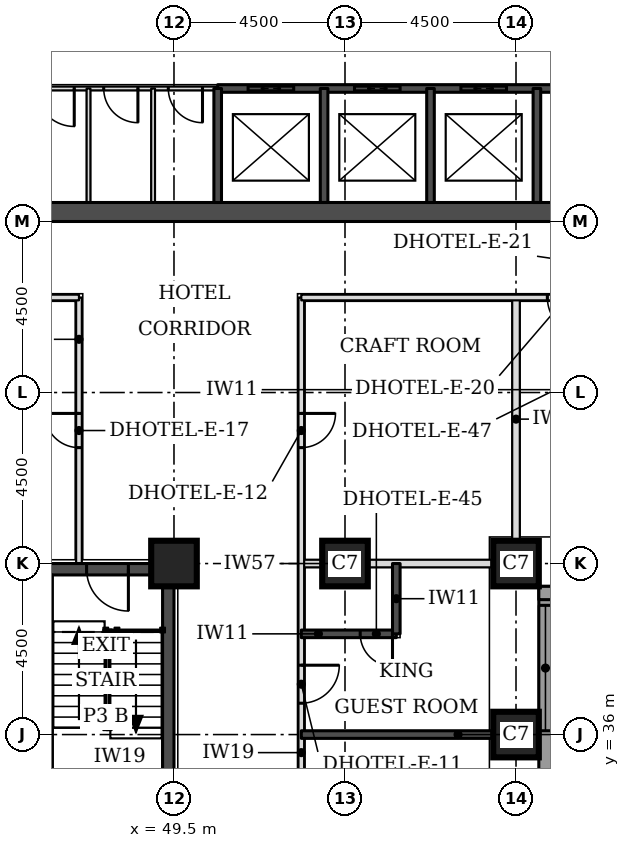
"""IFC4 building model, lengths in metres.
Left out: names, types, materials, properties, quantities, classifications, styles, units other than length and angle.
Written with IfcOpenShell. Run it as: python <this file> out.ifc"""

import sys

from ifc_helpers import new_model, si_unit, direction, frame, frame_2d, origin, origin_2d, place, context, subcontext, project, spatial, rectangle, extrude, element, fill, save


model = new_model("IFC4")
c1 = context("Model", 3, precision=1e-05, world=origin(), true_north=direction((0.0, 1.0)))
c2 = subcontext(c1, "Body", "Model", "MODEL_VIEW")
j1 = project(units=[si_unit("LENGTHUNIT", "METRE"), si_unit("PLANEANGLEUNIT", "RADIAN")], contexts=[c1])
p1 = place(None, origin())
s1 = spatial("IfcSite", under=j1, at=p1, CompositionType="ELEMENT")
p2 = place(p1, origin())
s2 = spatial("IfcBuilding", under=s1, at=p2, CompositionType="ELEMENT")
p3 = place(p2, frame((0.0, 0.0, 39.6)))
s3 = spatial("IfcBuildingStorey", under=s2, at=p3, CompositionType="ELEMENT", Elevation=39.6)
for number, where, z_axis, x_axis in (
    (1, (58.5, 36.0, 0.0), (0.0, 0.0, 1.0), (1.0, 0.0, 0.0)),
    (2, (49.5, 40.5, 0.0), (0.0, 0.0, 1.0), (1.0, 0.0, 0.0)),
    (3, (54.0, 40.5, 0.0), (0.0, 0.0, 1.0), (1.0, 0.0, 0.0)),
    (4, (58.5, 40.5, 0.0), (0.0, 0.0, 1.0), (1.0, 0.0, 0.0)),
):
    element("IfcColumn", number, at=place(p3, frame(where, z_axis=z_axis, x_axis=x_axis)), inside=s3, PredefinedType="COLUMN", context=c2, shape_type="SweptSolid", body=[
        extrude(rectangle(XDim=1.2, YDim=1.2, at=origin_2d()), origin(), (0.0, 0.0, 1.0), 3.3),
    ])
p4 = place(p3, frame((45.5, 49.75, 0.0), z_axis=(0.0, 0.0, 1.0), x_axis=(1.0, 0.0, 0.0)))
e5 = element("IfcWall", 5, at=p4, inside=s3, PredefinedType="SHEAR", context=c2, shape_type="SweptSolid", body=[
    extrude(rectangle(XDim=21.5, YDim=0.5, at=frame_2d((10.75, 0.0))), origin(), (0.0, 0.0, 1.0), 3.3),
])
p5 = place(p3, frame((40.8, 40.35, 0.0), z_axis=(0.0, 0.0, 1.0), x_axis=(1.0, 0.0, 0.0)))
e6 = element("IfcWall", 6, at=p5, inside=s3, PredefinedType="SHEAR", context=c2, shape_type="SweptSolid", body=[
    extrude(rectangle(XDim=8.4, YDim=0.3, at=frame_2d((4.2, 0.0))), origin(), (0.0, 0.0, 1.0), 3.3),
])
p6 = place(p5, frame((6.4, 0.0, 0.0)))
e7 = element("IfcOpeningElement", 7, at=p6, cuts=e6, PredefinedType="OPENING", context=c2, shape_type="SweptSolid", body=[
    extrude(rectangle(XDim=1.1, YDim=2.1, at=frame_2d((0.55, 1.05))), frame((0.0, 0.16, 0.0), z_axis=(0.0, -1.0, 0.0), x_axis=(1.0, 0.0, 0.0)), (0.0, 0.0, 1.0), 0.32),
])
p7 = place(p3, frame((49.35, 31.5, 0.0), z_axis=(0.0, 0.0, 1.0), x_axis=(0.0, 1.0, 0.0)))
e8 = element("IfcWall", 8, at=p7, inside=s3, PredefinedType="SHEAR", context=c2, shape_type="SweptSolid", body=[
    extrude(rectangle(XDim=9.0, YDim=0.3, at=frame_2d((4.5, 0.0))), origin(), (0.0, 0.0, 1.0), 3.3),
])
p8 = place(p3, frame((59.275, 22.106, 0.0), z_axis=(0.0, 0.0, 1.0), x_axis=(0.0, 1.0, 0.0)))
e9 = element("IfcWall", 9, at=p8, inside=s3, PredefinedType="STANDARD", context=c2, shape_type="SweptSolid", body=[
    extrude(rectangle(XDim=17.793, YDim=0.35, at=frame_2d((8.897, 0.0))), origin(), (0.0, 0.0, 1.0), 3.055),
])
p9 = place(p8, frame((5.493, 0.0, 0.8)))
e10 = element("IfcOpeningElement", 10, at=p9, cuts=e9, PredefinedType="OPENING", context=c2, shape_type="SweptSolid", body=[
    extrude(rectangle(XDim=3.3, YDim=1.5, at=frame_2d((1.65, 0.75))), frame((0.0, 0.185, 0.0), z_axis=(0.0, -1.0, 0.0), x_axis=(1.0, 0.0, 0.0)), (0.0, 0.0, 1.0), 0.37),
])
p10 = place(p8, frame((13.993, 0.0, 0.8)))
e11 = element("IfcOpeningElement", 11, at=p10, cuts=e9, PredefinedType="OPENING", context=c2, shape_type="SweptSolid", body=[
    extrude(rectangle(XDim=3.3, YDim=1.5, at=frame_2d((1.65, 0.75))), frame((0.0, 0.185, 0.0), z_axis=(0.0, -1.0, 0.0), x_axis=(1.0, 0.0, 0.0)), (0.0, 0.0, 1.0), 0.37),
])
p11 = place(p3, frame((59.1, 39.725, 0.0), z_axis=(0.0, 0.0, 1.0), x_axis=(1.0, 0.0, 0.0)))
e12 = element("IfcWall", 12, at=p11, inside=s3, PredefinedType="STANDARD", context=c2, shape_type="SweptSolid", body=[
    extrude(rectangle(XDim=13.293, YDim=0.35, at=frame_2d((6.647, 0.0))), origin(), (0.0, 0.0, 1.0), 3.055),
])
p12 = place(p11, frame((0.5, 0.0, 0.8)))
e13 = element("IfcOpeningElement", 13, at=p12, cuts=e12, PredefinedType="OPENING", context=c2, shape_type="SweptSolid", body=[
    extrude(rectangle(XDim=3.3, YDim=1.5, at=frame_2d((1.65, 0.75))), frame((0.0, 0.185, 0.0), z_axis=(0.0, -1.0, 0.0), x_axis=(1.0, 0.0, 0.0)), (0.0, 0.0, 1.0), 0.37),
])
p13 = place(p3, frame((52.85, 40.5, 0.0), z_axis=(0.0, 0.0, 1.0), x_axis=(1.0, 0.0, 0.0)))
e14 = element("IfcWall", 14, at=p13, inside=s3, PredefinedType="PARTITIONING", context=c2, shape_type="SweptSolid", body=[
    extrude(rectangle(XDim=5.05, YDim=0.2, at=frame_2d((2.525, 0.0))), origin(), (0.0, 0.0, 1.0), 2.33),
])
p14 = place(p3, frame((58.5, 41.1, 0.0), z_axis=(0.0, 0.0, 1.0), x_axis=(0.0, 1.0, 0.0)))
e15 = element("IfcWall", 15, at=p14, inside=s3, PredefinedType="PARTITIONING", context=c2, shape_type="SweptSolid", body=[
    extrude(rectangle(XDim=6.4, YDim=0.2, at=frame_2d((3.2, 0.0))), origin(), (0.0, 0.0, 1.0), 3.08),
])
p15 = place(p3, frame((52.85, 25.15, 0.0), z_axis=(0.0, 0.0, 1.0), x_axis=(0.0, 1.0, 0.0)))
e16 = element("IfcWall", 16, at=p15, inside=s3, PredefinedType="PARTITIONING", context=c2, shape_type="SweptSolid", body=[
    extrude(rectangle(XDim=22.35, YDim=0.15, at=frame_2d((11.175, 0.0))), origin(), (0.0, 0.0, 1.0), 3.08),
])
p16 = place(p15, frame((0.347, 0.0, 0.0)))
e17 = element("IfcOpeningElement", 17, at=p16, cuts=e16, PredefinedType="OPENING", context=c2, shape_type="SweptSolid", body=[
    extrude(rectangle(XDim=1.0, YDim=2.1, at=frame_2d((0.5, 1.05))), frame((0.0, 0.085, 0.0), z_axis=(0.0, -1.0, 0.0), x_axis=(1.0, 0.0, 0.0)), (0.0, 0.0, 1.0), 0.17),
])
p17 = place(p15, frame((7.325, 0.0, 0.0)))
e18 = element("IfcOpeningElement", 18, at=p17, cuts=e16, PredefinedType="OPENING", context=c2, shape_type="SweptSolid", body=[
    extrude(rectangle(XDim=1.0, YDim=2.1, at=frame_2d((0.5, 1.05))), frame((0.0, 0.085, 0.0), z_axis=(0.0, -1.0, 0.0), x_axis=(1.0, 0.0, 0.0)), (0.0, 0.0, 1.0), 0.17),
])
p18 = place(p15, frame((11.675, 0.0, 0.0)))
e19 = element("IfcOpeningElement", 19, at=p18, cuts=e16, PredefinedType="OPENING", context=c2, shape_type="SweptSolid", body=[
    extrude(rectangle(XDim=1.0, YDim=2.1, at=frame_2d((0.5, 1.05))), frame((0.0, 0.085, 0.0), z_axis=(0.0, -1.0, 0.0), x_axis=(1.0, 0.0, 0.0)), (0.0, 0.0, 1.0), 0.17),
])
p19 = place(p15, frame((18.4, 0.0, 0.0)))
e20 = element("IfcOpeningElement", 20, at=p19, cuts=e16, PredefinedType="OPENING", context=c2, shape_type="SweptSolid", body=[
    extrude(rectangle(XDim=0.9, YDim=2.1, at=frame_2d((0.45, 1.05))), frame((0.0, 0.085, 0.0), z_axis=(0.0, -1.0, 0.0), x_axis=(1.0, 0.0, 0.0)), (0.0, 0.0, 1.0), 0.17),
])
p20 = place(p3, frame((47.0, 40.5, 0.0), z_axis=(0.0, 0.0, 1.0), x_axis=(0.0, 1.0, 0.0)))
e21 = element("IfcWall", 21, at=p20, inside=s3, PredefinedType="PARTITIONING", context=c2, shape_type="SweptSolid", body=[
    extrude(rectangle(XDim=7.0, YDim=0.15, at=frame_2d((3.5, 0.0))), origin(), (0.0, 0.0, 1.0), 3.08),
])
p21 = place(p20, frame((3.05, 0.0, 0.0)))
e22 = element("IfcOpeningElement", 22, at=p21, cuts=e21, PredefinedType="OPENING", context=c2, shape_type="SweptSolid", body=[
    extrude(rectangle(XDim=0.9, YDim=2.1, at=frame_2d((0.45, 1.05))), frame((0.0, 0.085, 0.0), z_axis=(0.0, -1.0, 0.0), x_axis=(1.0, 0.0, 0.0)), (0.0, 0.0, 1.0), 0.17),
])
p22 = place(p3, frame((43.0, 47.5, 0.0), z_axis=(0.0, 0.0, 1.0), x_axis=(1.0, 0.0, 0.0)))
e23 = element("IfcWall", 23, at=p22, inside=s3, PredefinedType="PARTITIONING", context=c2, shape_type="SweptSolid", body=[
    extrude(rectangle(XDim=4.0, YDim=0.15, at=frame_2d((2.0, 0.0))), origin(), (0.0, 0.0, 1.0), 3.08),
])
p23 = place(p3, frame((52.85, 47.5, 0.0), z_axis=(0.0, 0.0, 1.0), x_axis=(1.0, 0.0, 0.0)))
e24 = element("IfcWall", 24, at=p23, inside=s3, PredefinedType="PARTITIONING", context=c2, shape_type="SweptSolid", body=[
    extrude(rectangle(XDim=16.65, YDim=0.15, at=frame_2d((8.325, 0.0))), origin(), (0.0, 0.0, 1.0), 3.08),
])
p24 = place(p23, frame((13.075, 0.0, 0.0)))
e25 = element("IfcOpeningElement", 25, at=p24, cuts=e24, PredefinedType="OPENING", context=c2, shape_type="SweptSolid", body=[
    extrude(rectangle(XDim=1.0, YDim=2.1, at=frame_2d((0.5, 1.05))), frame((0.0, 0.085, 0.0), z_axis=(0.0, -1.0, 0.0), x_axis=(1.0, 0.0, 0.0)), (0.0, 0.0, 1.0), 0.17),
])
p25 = place(p23, frame((6.475, 0.0, 0.0)))
e26 = element("IfcOpeningElement", 26, at=p25, cuts=e24, PredefinedType="OPENING", context=c2, shape_type="SweptSolid", body=[
    extrude(rectangle(XDim=1.0, YDim=2.1, at=frame_2d((0.5, 1.05))), frame((0.0, 0.085, 0.0), z_axis=(0.0, -1.0, 0.0), x_axis=(1.0, 0.0, 0.0)), (0.0, 0.0, 1.0), 0.17),
])
p26 = place(p23, frame((15.15, 0.0, 0.0)))
e27 = element("IfcOpeningElement", 27, at=p26, cuts=e24, PredefinedType="OPENING", context=c2, shape_type="SweptSolid", body=[
    extrude(rectangle(XDim=1.0, YDim=2.1, at=frame_2d((0.5, 1.05))), frame((0.0, 0.085, 0.0), z_axis=(0.0, -1.0, 0.0), x_axis=(1.0, 0.0, 0.0)), (0.0, 0.0, 1.0), 0.17),
])
p27 = place(p3, frame((52.85, 36.0, 0.0), z_axis=(0.0, 0.0, 1.0), x_axis=(1.0, 0.0, 0.0)))
e28 = element("IfcWall", 28, at=p27, inside=s3, PredefinedType="SOLIDWALL", context=c2, shape_type="SweptSolid", body=[
    extrude(rectangle(XDim=5.05, YDim=0.2, at=frame_2d((2.525, 0.0))), origin(), (0.0, 0.0, 1.0), 3.08),
])
p28 = place(p3, frame((52.85, 38.65, 0.0), z_axis=(0.0, 0.0, 1.0), x_axis=(1.0, 0.0, 0.0)))
e29 = element("IfcWall", 29, at=p28, inside=s3, PredefinedType="SOLIDWALL", context=c2, shape_type="SweptSolid", body=[
    extrude(rectangle(XDim=2.5, YDim=0.2, at=frame_2d((1.25, 0.0))), origin(), (0.0, 0.0, 1.0), 3.08),
])
p29 = place(p28, frame((1.55, 0.0, 0.0)))
e30 = element("IfcOpeningElement", 30, at=p29, cuts=e29, PredefinedType="OPENING", context=c2, shape_type="SweptSolid", body=[
    extrude(rectangle(XDim=0.85, YDim=2.1, at=frame_2d((0.425, 1.05))), frame((0.0, 0.11, 0.0), z_axis=(0.0, -1.0, 0.0), x_axis=(1.0, 0.0, 0.0)), (0.0, 0.0, 1.0), 0.22),
])
p30 = place(p3, frame((55.35, 38.65, 0.0), z_axis=(0.0, 0.0, 1.0), x_axis=(0.0, 1.0, 0.0)))
e31 = element("IfcWall", 31, at=p30, inside=s3, PredefinedType="SOLIDWALL", context=c2, shape_type="SweptSolid", body=[
    extrude(rectangle(XDim=1.85, YDim=0.2, at=frame_2d((0.925, 0.0))), origin(), (0.0, 0.0, 1.0), 3.08),
])
p31 = place(p3, frame((45.5, 53.0, 0.0), z_axis=(0.0, 0.0, 1.0), x_axis=(1.0, 0.0, 0.0)))
e32 = element("IfcWall", 32, at=p31, inside=s3, PredefinedType="PARTITIONING", context=c2, shape_type="SweptSolid", body=[
    extrude(rectangle(XDim=5.15, YDim=0.1, at=frame_2d((2.575, 0.0))), origin(), (0.0, 0.0, 1.0), 3.08),
])
p32 = place(p31, frame((0.375, 0.0, 0.0)))
e33 = element("IfcOpeningElement", 33, at=p32, cuts=e32, PredefinedType="OPENING", context=c2, shape_type="SweptSolid", body=[
    extrude(rectangle(XDim=1.0, YDim=2.1, at=frame_2d((0.5, 1.05))), frame((0.0, 0.06, 0.0), z_axis=(0.0, -1.0, 0.0), x_axis=(1.0, 0.0, 0.0)), (0.0, 0.0, 1.0), 0.12),
])
p33 = place(p31, frame((2.151, 0.0, 0.0)))
e34 = element("IfcOpeningElement", 34, at=p33, cuts=e32, PredefinedType="OPENING", context=c2, shape_type="SweptSolid", body=[
    extrude(rectangle(XDim=0.9, YDim=2.1, at=frame_2d((0.45, 1.05))), frame((0.0, 0.06, 0.0), z_axis=(0.0, -1.0, 0.0), x_axis=(1.0, 0.0, 0.0)), (0.0, 0.0, 1.0), 0.12),
])
p34 = place(p31, frame((3.85, 0.0, 0.0)))
e35 = element("IfcOpeningElement", 35, at=p34, cuts=e32, PredefinedType="OPENING", context=c2, shape_type="SweptSolid", body=[
    extrude(rectangle(XDim=0.9, YDim=2.1, at=frame_2d((0.45, 1.05))), frame((0.0, 0.06, 0.0), z_axis=(0.0, -1.0, 0.0), x_axis=(1.0, 0.0, 0.0)), (0.0, 0.0, 1.0), 0.12),
])
p35 = place(p3, frame((50.65, 53.0, 0.0), z_axis=(0.0, 0.0, 1.0), x_axis=(1.0, 0.0, 0.0)))
e36 = element("IfcWall", 36, at=p35, inside=s3, PredefinedType="SOLIDWALL", context=c2, shape_type="SweptSolid", body=[
    extrude(rectangle(XDim=11.2, YDim=0.2, at=frame_2d((5.6, 0.0))), origin(), (0.0, 0.0, 1.0), 3.08),
])
p36 = place(p35, frame((0.8, 0.0, 0.0)))
e37 = element("IfcOpeningElement", 37, at=p36, cuts=e36, PredefinedType="OPENING", context=c2, shape_type="SweptSolid", body=[
    extrude(rectangle(XDim=1.2, YDim=2.1, at=frame_2d((0.6, 1.05))), frame((0.0, 0.11, 0.0), z_axis=(0.0, -1.0, 0.0), x_axis=(1.0, 0.0, 0.0)), (0.0, 0.0, 1.0), 0.22),
])
p37 = place(p35, frame((3.6, 0.0, 0.0)))
e38 = element("IfcOpeningElement", 38, at=p37, cuts=e36, PredefinedType="OPENING", context=c2, shape_type="SweptSolid", body=[
    extrude(rectangle(XDim=1.2, YDim=2.1, at=frame_2d((0.6, 1.05))), frame((0.0, 0.11, 0.0), z_axis=(0.0, -1.0, 0.0), x_axis=(1.0, 0.0, 0.0)), (0.0, 0.0, 1.0), 0.22),
])
p38 = place(p35, frame((6.4, 0.0, 0.0)))
e39 = element("IfcOpeningElement", 39, at=p38, cuts=e36, PredefinedType="OPENING", context=c2, shape_type="SweptSolid", body=[
    extrude(rectangle(XDim=1.2, YDim=2.1, at=frame_2d((0.6, 1.05))), frame((0.0, 0.11, 0.0), z_axis=(0.0, -1.0, 0.0), x_axis=(1.0, 0.0, 0.0)), (0.0, 0.0, 1.0), 0.22),
])
p39 = place(p35, frame((9.2, 0.0, 0.0)))
e40 = element("IfcOpeningElement", 40, at=p39, cuts=e36, PredefinedType="OPENING", context=c2, shape_type="SweptSolid", body=[
    extrude(rectangle(XDim=1.2, YDim=2.1, at=frame_2d((0.6, 1.05))), frame((0.0, 0.11, 0.0), z_axis=(0.0, -1.0, 0.0), x_axis=(1.0, 0.0, 0.0)), (0.0, 0.0, 1.0), 0.22),
])
for number, where, z_axis, x_axis in (
    (41, (47.251, 50.0, 0.0), (0.0, 0.0, 1.0), (0.0, 1.0, 0.0)),
    (42, (48.95, 50.0, 0.0), (0.0, 0.0, 1.0), (0.0, 1.0, 0.0)),
):
    element("IfcWall", number, at=place(p3, frame(where, z_axis=z_axis, x_axis=x_axis)), inside=s3, PredefinedType="PARTITIONING", context=c2, shape_type="SweptSolid", body=[
        extrude(rectangle(XDim=3.0, YDim=0.1, at=frame_2d((1.5, 0.0))), origin(), (0.0, 0.0, 1.0), 3.08),
    ])
for number, where, z_axis, x_axis in (
    (43, (50.65, 50.0, 0.0), (0.0, 0.0, 1.0), (0.0, 1.0, 0.0)),
    (44, (53.45, 50.0, 0.0), (0.0, 0.0, 1.0), (0.0, 1.0, 0.0)),
    (45, (56.25, 50.0, 0.0), (0.0, 0.0, 1.0), (0.0, 1.0, 0.0)),
    (46, (59.05, 50.0, 0.0), (0.0, 0.0, 1.0), (0.0, 1.0, 0.0)),
):
    element("IfcWall", number, at=place(p3, frame(where, z_axis=z_axis, x_axis=x_axis)), inside=s3, PredefinedType="SOLIDWALL", context=c2, shape_type="SweptSolid", body=[
        extrude(rectangle(XDim=3.0, YDim=0.2, at=frame_2d((1.5, 0.0))), origin(), (0.0, 0.0, 1.0), 3.08),
    ])
p40 = place(p10, origin())
e47 = element("IfcWindow", 47, at=p40, inside=s3, PartitioningType="SINGLE_PANEL", PredefinedType="WINDOW", context=c2, shape_type="SweptSolid", body=[
    extrude(rectangle(XDim=3.3, YDim=1.5, at=frame_2d((1.65, 0.75))), frame((0.0, 0.085, 0.0), z_axis=(0.0, -1.0, 0.0), x_axis=(1.0, 0.0, 0.0)), (0.0, 0.0, 1.0), 0.06),
])
fill(e11, e47)
p41 = place(p18, frame((1.0, 0.0, 0.0), z_axis=(0.0, 0.0, 1.0), x_axis=(-1.0, 0.0, 0.0)))
e48 = element("IfcDoor", 48, at=p41, inside=s3, OperationType="SINGLE_SWING_LEFT", PredefinedType="DOOR", context=c2, shape_type="SweptSolid", body=[
    extrude(rectangle(XDim=1.0, YDim=2.1, at=frame_2d((0.5, 1.05))), frame((0.0, 0.025, 0.0), z_axis=(0.0, -1.0, 0.0), x_axis=(1.0, 0.0, 0.0)), (0.0, 0.0, 1.0), 0.05),
])
fill(e19, e48)
p42 = place(p29, frame((0.85, 0.0, 0.0), z_axis=(0.0, 0.0, 1.0), x_axis=(-1.0, 0.0, 0.0)))
e49 = element("IfcDoor", 49, at=p42, inside=s3, OperationType="SINGLE_SWING_LEFT", PredefinedType="DOOR", context=c2, shape_type="SweptSolid", body=[
    extrude(rectangle(XDim=0.85, YDim=2.1, at=frame_2d((0.425, 1.05))), frame((0.0, 0.025, 0.0), z_axis=(0.0, -1.0, 0.0), x_axis=(1.0, 0.0, 0.0)), (0.0, 0.0, 1.0), 0.05),
])
fill(e30, e49)
p43 = place(p25, frame((1.0, 0.0, 0.0), z_axis=(0.0, 0.0, 1.0), x_axis=(-1.0, 0.0, 0.0)))
e50 = element("IfcDoor", 50, at=p43, inside=s3, OperationType="SINGLE_SWING_LEFT", PredefinedType="DOOR", context=c2, shape_type="SweptSolid", body=[
    extrude(rectangle(XDim=1.0, YDim=2.1, at=frame_2d((0.5, 1.05))), frame((0.0, 0.025, 0.0), z_axis=(0.0, -1.0, 0.0), x_axis=(1.0, 0.0, 0.0)), (0.0, 0.0, 1.0), 0.05),
])
fill(e26, e50)
p44 = place(p21, origin())
e51 = element("IfcDoor", 51, at=p44, inside=s3, OperationType="SINGLE_SWING_RIGHT", PredefinedType="DOOR", context=c2, shape_type="SweptSolid", body=[
    extrude(rectangle(XDim=0.9, YDim=2.1, at=frame_2d((0.45, 1.05))), frame((0.0, 0.025, 0.0), z_axis=(0.0, -1.0, 0.0), x_axis=(1.0, 0.0, 0.0)), (0.0, 0.0, 1.0), 0.05),
])
fill(e22, e51)
p45 = place(p19, frame((0.9, 0.0, 0.0), z_axis=(0.0, 0.0, 1.0), x_axis=(-1.0, 0.0, 0.0)))
e52 = element("IfcDoor", 52, at=p45, inside=s3, OperationType="SINGLE_SWING_LEFT", PredefinedType="DOOR", context=c2, shape_type="SweptSolid", body=[
    extrude(rectangle(XDim=0.9, YDim=2.1, at=frame_2d((0.45, 1.05))), frame((0.0, 0.025, 0.0), z_axis=(0.0, -1.0, 0.0), x_axis=(1.0, 0.0, 0.0)), (0.0, 0.0, 1.0), 0.05),
])
fill(e20, e52)
p46 = place(p36, origin())
e53 = element("IfcDoor", 53, at=p46, inside=s3, OperationType="DOUBLE_DOOR_SLIDING", PredefinedType="DOOR", context=c2, shape_type="SweptSolid", body=[
    extrude(rectangle(XDim=1.2, YDim=2.1, at=frame_2d((0.6, 1.05))), frame((0.0, 0.025, 0.0), z_axis=(0.0, -1.0, 0.0), x_axis=(1.0, 0.0, 0.0)), (0.0, 0.0, 1.0), 0.05),
])
fill(e37, e53)
p47 = place(p37, origin())
e54 = element("IfcDoor", 54, at=p47, inside=s3, OperationType="DOUBLE_DOOR_SLIDING", PredefinedType="DOOR", context=c2, shape_type="SweptSolid", body=[
    extrude(rectangle(XDim=1.2, YDim=2.1, at=frame_2d((0.6, 1.05))), frame((0.0, 0.025, 0.0), z_axis=(0.0, -1.0, 0.0), x_axis=(1.0, 0.0, 0.0)), (0.0, 0.0, 1.0), 0.05),
])
fill(e38, e54)
p48 = place(p38, origin())
e55 = element("IfcDoor", 55, at=p48, inside=s3, OperationType="DOUBLE_DOOR_SLIDING", PredefinedType="DOOR", context=c2, shape_type="SweptSolid", body=[
    extrude(rectangle(XDim=1.2, YDim=2.1, at=frame_2d((0.6, 1.05))), frame((0.0, 0.025, 0.0), z_axis=(0.0, -1.0, 0.0), x_axis=(1.0, 0.0, 0.0)), (0.0, 0.0, 1.0), 0.05),
])
fill(e39, e55)
p49 = place(p32, frame((1.0, 0.0, 0.0), z_axis=(0.0, 0.0, 1.0), x_axis=(-1.0, 0.0, 0.0)))
e56 = element("IfcDoor", 56, at=p49, inside=s3, OperationType="SINGLE_SWING_LEFT", PredefinedType="DOOR", context=c2, shape_type="SweptSolid", body=[
    extrude(rectangle(XDim=1.0, YDim=2.1, at=frame_2d((0.5, 1.05))), frame((0.0, 0.025, 0.0), z_axis=(0.0, -1.0, 0.0), x_axis=(1.0, 0.0, 0.0)), (0.0, 0.0, 1.0), 0.05),
])
fill(e33, e56)
p50 = place(p33, frame((0.9, 0.0, 0.0), z_axis=(0.0, 0.0, 1.0), x_axis=(-1.0, 0.0, 0.0)))
e57 = element("IfcDoor", 57, at=p50, inside=s3, OperationType="SINGLE_SWING_LEFT", PredefinedType="DOOR", context=c2, shape_type="SweptSolid", body=[
    extrude(rectangle(XDim=0.9, YDim=2.1, at=frame_2d((0.45, 1.05))), frame((0.0, 0.025, 0.0), z_axis=(0.0, -1.0, 0.0), x_axis=(1.0, 0.0, 0.0)), (0.0, 0.0, 1.0), 0.05),
])
fill(e34, e57)
p51 = place(p34, frame((0.9, 0.0, 0.0), z_axis=(0.0, 0.0, 1.0), x_axis=(-1.0, 0.0, 0.0)))
e58 = element("IfcDoor", 58, at=p51, inside=s3, OperationType="SINGLE_SWING_LEFT", PredefinedType="DOOR", context=c2, shape_type="SweptSolid", body=[
    extrude(rectangle(XDim=0.9, YDim=2.1, at=frame_2d((0.45, 1.05))), frame((0.0, 0.025, 0.0), z_axis=(0.0, -1.0, 0.0), x_axis=(1.0, 0.0, 0.0)), (0.0, 0.0, 1.0), 0.05),
])
fill(e35, e58)
p52 = place(p6, frame((1.1, 0.0, 0.0), z_axis=(0.0, 0.0, 1.0), x_axis=(-1.0, 0.0, 0.0)))
e59 = element("IfcDoor", 59, at=p52, inside=s3, OperationType="SINGLE_SWING_LEFT", PredefinedType="DOOR", context=c2, shape_type="SweptSolid", body=[
    extrude(rectangle(XDim=1.1, YDim=2.1, at=frame_2d((0.55, 1.05))), frame((0.0, 0.025, 0.0), z_axis=(0.0, -1.0, 0.0), x_axis=(1.0, 0.0, 0.0)), (0.0, 0.0, 1.0), 0.05),
])
fill(e7, e59)
save(model, sys.argv[1])
